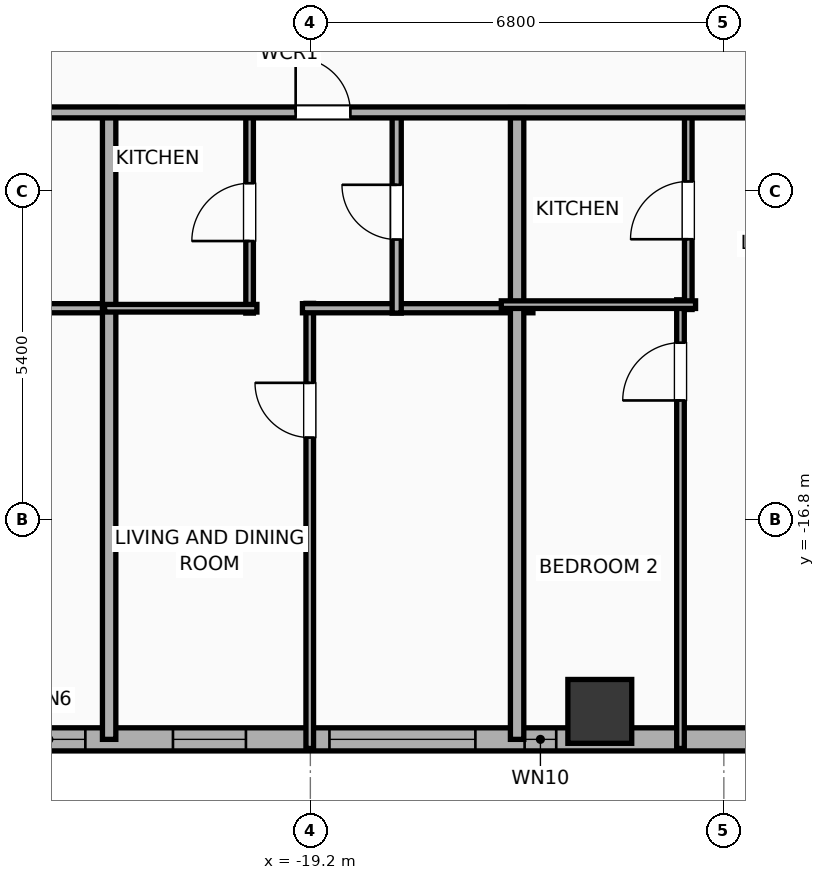
"""IFC4 building model, lengths in metres.
Left out: names, types, materials, properties, quantities, classifications, styles, units other than length and angle.
Written with IfcOpenShell. Run it as: python <this file> out.ifc"""

import sys

from ifc_helpers import new_model, si_unit, direction, frame, frame_2d, origin, origin_2d, place, context, subcontext, project, spatial, rectangle, hollow_rectangle, extrude, element, fill, save


model = new_model("IFC4")
c1 = context("Model", 3, precision=1e-05, world=origin(), true_north=direction((0.0, 1.0)))
c2 = subcontext(c1, "Body", "Model", "MODEL_VIEW")
j1 = project(units=[si_unit("LENGTHUNIT", "METRE"), si_unit("PLANEANGLEUNIT", "RADIAN")], contexts=[c1])
p1 = place(None, origin())
s1 = spatial("IfcSite", under=j1, at=p1, CompositionType="ELEMENT")
p2 = place(p1, origin())
s2 = spatial("IfcBuilding", under=s1, at=p2, CompositionType="ELEMENT")
p3 = place(p2, frame((0.0, 0.0, 97.5)))
s3 = spatial("IfcBuildingStorey", under=s2, at=p3, CompositionType="ELEMENT", Elevation=97.5)
p4 = place(p3, frame((-14.44, -19.95, 0.0), z_axis=(0.0, 0.0, 1.0), x_axis=(1.0, 0.0, 0.0)))
e1 = element("IfcColumn", 1, at=p4, inside=s3, PredefinedType="COLUMN", context=c2, shape_type="SweptSolid", body=[
    extrude(hollow_rectangle(XDim=1.05, YDim=1.05, WallThickness=0.036, at=origin_2d()), origin(), (0.0, 0.0, 1.0), 3.9),
])
p5 = place(p3, frame((29.381, -20.41, 0.0), z_axis=(0.0, 0.0, 1.0), x_axis=(-1.0, 0.0, 0.0)))
e2 = element("IfcWall", 2, at=p5, inside=s3, PredefinedType="ELEMENTEDWALL", context=c2, shape_type="SweptSolid", body=[
    extrude(rectangle(XDim=54.763, YDim=0.38, at=frame_2d((27.381, 0.0))), origin(), (0.0, 0.0, 1.0), 3.65),
])
p6 = place(p5, frame((6.495, 0.0, 0.75)))
e3 = element("IfcOpeningElement", 3, at=p6, cuts=e2, PredefinedType="OPENING", context=c2, shape_type="SweptSolid", body=[
    extrude(rectangle(XDim=2.4, YDim=2.1, at=frame_2d((1.2, 1.05))), frame((0.0, 0.2, 0.0), z_axis=(0.0, -1.0, 0.0), x_axis=(1.0, 0.0, 0.0)), (0.0, 0.0, 1.0), 0.4),
])
p7 = place(p5, frame((17.686, 0.0, 0.75)))
e4 = element("IfcOpeningElement", 4, at=p7, cuts=e2, PredefinedType="OPENING", context=c2, shape_type="SweptSolid", body=[
    extrude(rectangle(XDim=2.4, YDim=2.1, at=frame_2d((1.2, 1.05))), frame((0.0, 0.2, 0.0), z_axis=(0.0, -1.0, 0.0), x_axis=(1.0, 0.0, 0.0)), (0.0, 0.0, 1.0), 0.4),
])
p8 = place(p5, frame((34.677, 0.0, 0.75)))
e5 = element("IfcOpeningElement", 5, at=p8, cuts=e2, PredefinedType="OPENING", context=c2, shape_type="SweptSolid", body=[
    extrude(rectangle(XDim=2.4, YDim=2.1, at=frame_2d((1.2, 1.05))), frame((0.0, 0.2, 0.0), z_axis=(0.0, -1.0, 0.0), x_axis=(1.0, 0.0, 0.0)), (0.0, 0.0, 1.0), 0.4),
])
p9 = place(p5, frame((45.867, 0.0, 0.75)))
e6 = element("IfcOpeningElement", 6, at=p9, cuts=e2, PredefinedType="OPENING", context=c2, shape_type="SweptSolid", body=[
    extrude(rectangle(XDim=2.4, YDim=2.1, at=frame_2d((1.2, 1.05))), frame((0.0, 0.2, 0.0), z_axis=(0.0, -1.0, 0.0), x_axis=(1.0, 0.0, 0.0)), (0.0, 0.0, 1.0), 0.4),
])
p10 = place(p5, frame((52.281, 0.0, 0.75)))
e7 = element("IfcOpeningElement", 7, at=p10, cuts=e2, PredefinedType="OPENING", context=c2, shape_type="SweptSolid", body=[
    extrude(rectangle(XDim=1.2, YDim=2.05, at=frame_2d((0.6, 1.025))), frame((0.0, 0.2, 0.0), z_axis=(0.0, -1.0, 0.0), x_axis=(1.0, 0.0, 0.0)), (0.0, 0.0, 1.0), 0.4),
])
p11 = place(p5, frame((49.641, 0.0, 0.75)))
e8 = element("IfcOpeningElement", 8, at=p11, cuts=e2, PredefinedType="OPENING", context=c2, shape_type="SweptSolid", body=[
    extrude(rectangle(XDim=1.2, YDim=2.05, at=frame_2d((0.6, 1.025))), frame((0.0, 0.2, 0.0), z_axis=(0.0, -1.0, 0.0), x_axis=(1.0, 0.0, 0.0)), (0.0, 0.0, 1.0), 0.4),
])
p12 = place(p5, frame((39.543, 0.0, 0.75)))
e9 = element("IfcOpeningElement", 9, at=p12, cuts=e2, PredefinedType="OPENING", context=c2, shape_type="SweptSolid", body=[
    extrude(rectangle(XDim=1.2, YDim=2.05, at=frame_2d((0.6, 1.025))), frame((0.0, 0.2, 0.0), z_axis=(0.0, -1.0, 0.0), x_axis=(1.0, 0.0, 0.0)), (0.0, 0.0, 1.0), 0.4),
])
p13 = place(p5, frame((44.538, 0.0, 0.75)))
e10 = element("IfcOpeningElement", 10, at=p13, cuts=e2, PredefinedType="OPENING", context=c2, shape_type="SweptSolid", body=[
    extrude(rectangle(XDim=0.52, YDim=2.05, at=frame_2d((0.26, 1.025))), frame((0.0, 0.2, 0.0), z_axis=(0.0, -1.0, 0.0), x_axis=(1.0, 0.0, 0.0)), (0.0, 0.0, 1.0), 0.4),
])
p14 = place(p5, frame((28.206, 0.0, 0.75)))
e11 = element("IfcOpeningElement", 11, at=p14, cuts=e2, PredefinedType="OPENING", context=c2, shape_type="SweptSolid", body=[
    extrude(rectangle(XDim=1.2, YDim=2.05, at=frame_2d((0.6, 1.025))), frame((0.0, 0.2, 0.0), z_axis=(0.0, -1.0, 0.0), x_axis=(1.0, 0.0, 0.0)), (0.0, 0.0, 1.0), 0.4),
])
p15 = place(p5, frame((31.241, 0.0, 0.75)))
e12 = element("IfcOpeningElement", 12, at=p15, cuts=e2, PredefinedType="OPENING", context=c2, shape_type="SweptSolid", body=[
    extrude(rectangle(XDim=0.85, YDim=2.05, at=frame_2d((0.425, 1.025))), frame((0.0, 0.2, 0.0), z_axis=(0.0, -1.0, 0.0), x_axis=(1.0, 0.0, 0.0)), (0.0, 0.0, 1.0), 0.4),
])
p16 = place(p5, frame((24.561, 0.0, 0.75)))
e13 = element("IfcOpeningElement", 13, at=p16, cuts=e2, PredefinedType="OPENING", context=c2, shape_type="SweptSolid", body=[
    extrude(rectangle(XDim=1.2, YDim=2.05, at=frame_2d((0.6, 1.025))), frame((0.0, 0.2, 0.0), z_axis=(0.0, -1.0, 0.0), x_axis=(1.0, 0.0, 0.0)), (0.0, 0.0, 1.0), 0.4),
])
p17 = place(p5, frame((22.561, 0.0, 0.75)))
e14 = element("IfcOpeningElement", 14, at=p17, cuts=e2, PredefinedType="OPENING", context=c2, shape_type="SweptSolid", body=[
    extrude(rectangle(XDim=0.52, YDim=2.05, at=frame_2d((0.26, 1.025))), frame((0.0, 0.2, 0.0), z_axis=(0.0, -1.0, 0.0), x_axis=(1.0, 0.0, 0.0)), (0.0, 0.0, 1.0), 0.4),
])
p18 = place(p5, frame((13.886, 0.0, 0.75)))
e15 = element("IfcOpeningElement", 15, at=p18, cuts=e2, PredefinedType="OPENING", context=c2, shape_type="SweptSolid", body=[
    extrude(rectangle(XDim=1.2, YDim=2.05, at=frame_2d((0.6, 1.025))), frame((0.0, 0.2, 0.0), z_axis=(0.0, -1.0, 0.0), x_axis=(1.0, 0.0, 0.0)), (0.0, 0.0, 1.0), 0.4),
])
p19 = place(p5, frame((11.694, 0.0, 0.75)))
e16 = element("IfcOpeningElement", 16, at=p19, cuts=e2, PredefinedType="OPENING", context=c2, shape_type="SweptSolid", body=[
    extrude(rectangle(XDim=0.85, YDim=2.05, at=frame_2d((0.425, 1.025))), frame((0.0, 0.2, 0.0), z_axis=(0.0, -1.0, 0.0), x_axis=(1.0, 0.0, 0.0)), (0.0, 0.0, 1.0), 0.4),
])
p20 = place(p5, frame((3.286, 0.0, 0.75)))
e17 = element("IfcOpeningElement", 17, at=p20, cuts=e2, PredefinedType="OPENING", context=c2, shape_type="SweptSolid", body=[
    extrude(rectangle(XDim=1.2, YDim=2.05, at=frame_2d((0.6, 1.025))), frame((0.0, 0.2, 0.0), z_axis=(0.0, -1.0, 0.0), x_axis=(1.0, 0.0, 0.0)), (0.0, 0.0, 1.0), 0.4),
])
p21 = place(p5, frame((0.816, 0.0, 0.75)))
e18 = element("IfcOpeningElement", 18, at=p21, cuts=e2, PredefinedType="OPENING", context=c2, shape_type="SweptSolid", body=[
    extrude(rectangle(XDim=1.2, YDim=2.05, at=frame_2d((0.6, 1.025))), frame((0.0, 0.2, 0.0), z_axis=(0.0, -1.0, 0.0), x_axis=(1.0, 0.0, 0.0)), (0.0, 0.0, 1.0), 0.4),
])
p22 = place(p3, frame((-26.039, -13.32, 0.0), z_axis=(0.0, 0.0, 1.0), x_axis=(1.0, 0.0, 0.0)))
e19 = element("IfcWall", 19, at=p22, inside=s3, PredefinedType="PLUMBINGWALL", context=c2, shape_type="SweptSolid", body=[
    extrude(rectangle(XDim=3.605, YDim=0.15, at=frame_2d((1.802, 0.0))), origin(), (0.0, 0.0, 1.0), 3.65),
])
p23 = place(p3, frame((-22.509, -20.41, 0.0), z_axis=(0.0, 0.0, 1.0), x_axis=(0.0, 1.0, 0.0)))
e20 = element("IfcWall", 20, at=p23, inside=s3, PredefinedType="PARTITIONING", context=c2, shape_type="SweptSolid", body=[
    extrude(rectangle(XDim=10.39, YDim=0.22, at=frame_2d((5.195, 0.0))), origin(), (0.0, 0.0, 1.0), 3.65),
])
p24 = place(p3, frame((-19.21, -20.56, 0.0), z_axis=(0.0, 0.0, 1.0), x_axis=(0.0, 1.0, 0.0)))
e21 = element("IfcWall", 21, at=p24, inside=s3, PredefinedType="PARTITIONING", context=c2, shape_type="SweptSolid", body=[
    extrude(rectangle(XDim=7.32, YDim=0.125, at=frame_2d((3.66, 0.0))), origin(), (0.0, 0.0, 1.0), 3.65),
])
p25 = place(p24, frame((5.113, 0.0, 0.0)))
e22 = element("IfcOpeningElement", 22, at=p25, cuts=e21, PredefinedType="OPENING", context=c2, shape_type="SweptSolid", body=[
    extrude(rectangle(XDim=0.9, YDim=2.05, at=frame_2d((0.45, 1.025))), frame((0.0, 0.073, 0.0), z_axis=(0.0, -1.0, 0.0), x_axis=(1.0, 0.0, 0.0)), (0.0, 0.0, 1.0), 0.145),
])
p26 = place(p3, frame((-19.33, -13.32, 0.0), z_axis=(0.0, 0.0, 1.0), x_axis=(1.0, 0.0, 0.0)))
e23 = element("IfcWall", 23, at=p26, inside=s3, PredefinedType="PLUMBINGWALL", context=c2, shape_type="SweptSolid", body=[
    extrude(rectangle(XDim=3.79, YDim=0.15, at=frame_2d((1.895, 0.0))), origin(), (0.0, 0.0, 1.0), 3.65),
])
p27 = place(p3, frame((-20.199, -13.4, 0.0), z_axis=(0.0, 0.0, 1.0), x_axis=(0.0, 1.0, 0.0)))
e24 = element("IfcWall", 24, at=p27, inside=s3, PredefinedType="PARTITIONING", context=c2, shape_type="SweptSolid", body=[
    extrude(rectangle(XDim=3.32, YDim=0.125, at=frame_2d((1.66, 0.0))), origin(), (0.0, 0.0, 1.0), 3.65),
])
p28 = place(p27, frame((1.185, 0.0, 0.0)))
e25 = element("IfcOpeningElement", 25, at=p28, cuts=e24, PredefinedType="OPENING", context=c2, shape_type="SweptSolid", body=[
    extrude(rectangle(XDim=0.95, YDim=2.05, at=frame_2d((0.475, 1.025))), frame((0.0, 0.073, 0.0), z_axis=(0.0, -1.0, 0.0), x_axis=(1.0, 0.0, 0.0)), (0.0, 0.0, 1.0), 0.145),
])
p29 = place(p3, frame((-22.584, -13.32, 0.0), z_axis=(0.0, 0.0, 1.0), x_axis=(1.0, 0.0, 0.0)))
e26 = element("IfcWall", 26, at=p29, inside=s3, PredefinedType="PARTITIONING", context=c2, shape_type="SweptSolid", body=[
    extrude(rectangle(XDim=2.505, YDim=0.125, at=frame_2d((1.252, 0.0))), origin(), (0.0, 0.0, 1.0), 3.65),
])
p30 = place(p3, frame((-17.78, -13.4, 0.0), z_axis=(0.0, 0.0, 1.0), x_axis=(0.0, 1.0, 0.0)))
e27 = element("IfcWall", 27, at=p30, inside=s3, PredefinedType="PLUMBINGWALL", context=c2, shape_type="SweptSolid", body=[
    extrude(rectangle(XDim=3.32, YDim=0.15, at=frame_2d((1.66, 0.0))), origin(), (0.0, 0.0, 1.0), 3.65),
])
p31 = place(p30, frame((1.21, 0.0, 0.0)))
e28 = element("IfcOpeningElement", 28, at=p31, cuts=e27, PredefinedType="OPENING", context=c2, shape_type="SweptSolid", body=[
    extrude(rectangle(XDim=0.9, YDim=2.05, at=frame_2d((0.45, 1.025))), frame((0.0, 0.085, 0.0), z_axis=(0.0, -1.0, 0.0), x_axis=(1.0, 0.0, 0.0)), (0.0, 0.0, 1.0), 0.17),
])
p32 = place(p3, frame((-15.8, -20.41, 0.0), z_axis=(0.0, 0.0, 1.0), x_axis=(0.0, 1.0, 0.0)))
e29 = element("IfcWall", 29, at=p32, inside=s3, PredefinedType="PARTITIONING", context=c2, shape_type="SweptSolid", body=[
    extrude(rectangle(XDim=10.39, YDim=0.22, at=frame_2d((5.195, 0.0))), origin(), (0.0, 0.0, 1.0), 3.65),
])
p33 = place(p3, frame((-13.113, -20.56, 0.0), z_axis=(0.0, 0.0, 1.0), x_axis=(0.0, 1.0, 0.0)))
e30 = element("IfcWall", 30, at=p33, inside=s3, PredefinedType="PARTITIONING", context=c2, shape_type="SweptSolid", body=[
    extrude(rectangle(XDim=7.379, YDim=0.125, at=frame_2d((3.689, 0.0))), origin(), (0.0, 0.0, 1.0), 3.65),
])
p34 = place(p33, frame((5.723, 0.0, 0.0)))
e31 = element("IfcOpeningElement", 31, at=p34, cuts=e30, PredefinedType="OPENING", context=c2, shape_type="SweptSolid", body=[
    extrude(rectangle(XDim=0.95, YDim=2.05, at=frame_2d((0.475, 1.025))), frame((0.0, 0.073, 0.0), z_axis=(0.0, -1.0, 0.0), x_axis=(1.0, 0.0, 0.0)), (0.0, 0.0, 1.0), 0.145),
])
p35 = place(p3, frame((-12.985, -13.341, 0.0), z_axis=(0.0, 0.0, 1.0), x_axis=(0.0, 1.0, 0.0)))
e32 = element("IfcWall", 32, at=p35, inside=s3, PredefinedType="PARTITIONING", context=c2, shape_type="SweptSolid", body=[
    extrude(rectangle(XDim=3.261, YDim=0.125, at=frame_2d((1.63, 0.0))), origin(), (0.0, 0.0, 1.0), 3.65),
])
p36 = place(p35, frame((1.156, 0.0, 0.0)))
e33 = element("IfcOpeningElement", 33, at=p36, cuts=e32, PredefinedType="OPENING", context=c2, shape_type="SweptSolid", body=[
    extrude(rectangle(XDim=0.95, YDim=2.05, at=frame_2d((0.475, 1.025))), frame((0.0, 0.073, 0.0), z_axis=(0.0, -1.0, 0.0), x_axis=(1.0, 0.0, 0.0)), (0.0, 0.0, 1.0), 0.145),
])
p37 = place(p3, frame((-16.06, -13.261, 0.0), z_axis=(0.0, 0.0, 1.0), x_axis=(1.0, 0.0, 0.0)))
e34 = element("IfcWall", 34, at=p37, inside=s3, PredefinedType="PARTITIONING", context=c2, shape_type="SweptSolid", body=[
    extrude(rectangle(XDim=3.195, YDim=0.125, at=frame_2d((1.598, 0.0))), origin(), (0.0, 0.0, 1.0), 3.65),
])
p38 = place(p3, frame((-29.21, -10.1, 0.0), z_axis=(0.0, 0.0, 1.0), x_axis=(1.0, 0.0, 0.0)))
e35 = element("IfcWall", 35, at=p38, inside=s3, PredefinedType="PARTITIONING", context=c2, shape_type="SweptSolid", body=[
    extrude(rectangle(XDim=62.42, YDim=0.18, at=frame_2d((31.21, 0.0))), origin(), (0.0, 0.0, 1.0), 3.65),
])
p39 = place(p38, frame((3.033, 0.0, 0.0)))
e36 = element("IfcOpeningElement", 36, at=p39, cuts=e35, PredefinedType="OPENING", context=c2, shape_type="SweptSolid", body=[
    extrude(rectangle(XDim=0.9, YDim=2.05, at=frame_2d((0.45, 1.025))), frame((0.0, 0.1, 0.0), z_axis=(0.0, -1.0, 0.0), x_axis=(1.0, 0.0, 0.0)), (0.0, 0.0, 1.0), 0.2),
])
p40 = place(p38, frame((9.768, 0.0, 0.0)))
e37 = element("IfcOpeningElement", 37, at=p40, cuts=e35, PredefinedType="OPENING", context=c2, shape_type="SweptSolid", body=[
    extrude(rectangle(XDim=0.9, YDim=2.05, at=frame_2d((0.45, 1.025))), frame((0.0, 0.1, 0.0), z_axis=(0.0, -1.0, 0.0), x_axis=(1.0, 0.0, 0.0)), (0.0, 0.0, 1.0), 0.2),
])
p41 = place(p38, frame((18.65, 0.0, 0.0)))
e38 = element("IfcOpeningElement", 38, at=p41, cuts=e35, PredefinedType="OPENING", context=c2, shape_type="SweptSolid", body=[
    extrude(rectangle(XDim=1.15, YDim=2.05, at=frame_2d((0.575, 1.025))), frame((0.0, 0.1, 0.0), z_axis=(0.0, -1.0, 0.0), x_axis=(1.0, 0.0, 0.0)), (0.0, 0.0, 1.0), 0.2),
])
p42 = place(p38, frame((29.212, 0.0, 0.0)))
e39 = element("IfcOpeningElement", 39, at=p42, cuts=e35, PredefinedType="OPENING", context=c2, shape_type="SweptSolid", body=[
    extrude(rectangle(XDim=1.15, YDim=2.05, at=frame_2d((0.575, 1.025))), frame((0.0, 0.1, 0.0), z_axis=(0.0, -1.0, 0.0), x_axis=(1.0, 0.0, 0.0)), (0.0, 0.0, 1.0), 0.2),
])
p43 = place(p38, frame((40.379, 0.0, 0.0)))
e40 = element("IfcOpeningElement", 40, at=p43, cuts=e35, PredefinedType="OPENING", context=c2, shape_type="SweptSolid", body=[
    extrude(rectangle(XDim=1.15, YDim=2.05, at=frame_2d((0.575, 1.025))), frame((0.0, 0.1, 0.0), z_axis=(0.0, -1.0, 0.0), x_axis=(1.0, 0.0, 0.0)), (0.0, 0.0, 1.0), 0.2),
])
p44 = place(p38, frame((50.959, 0.0, 0.0)))
e41 = element("IfcOpeningElement", 41, at=p44, cuts=e35, PredefinedType="OPENING", context=c2, shape_type="SweptSolid", body=[
    extrude(rectangle(XDim=1.15, YDim=2.05, at=frame_2d((0.575, 1.025))), frame((0.0, 0.1, 0.0), z_axis=(0.0, -1.0, 0.0), x_axis=(1.0, 0.0, 0.0)), (0.0, 0.0, 1.0), 0.2),
])
p45 = place(p38, frame((59.117, 0.0, 0.0)))
e42 = element("IfcOpeningElement", 42, at=p45, cuts=e35, PredefinedType="OPENING", context=c2, shape_type="SweptSolid", body=[
    extrude(rectangle(XDim=0.9, YDim=2.05, at=frame_2d((0.45, 1.025))), frame((0.0, 0.1, 0.0), z_axis=(0.0, -1.0, 0.0), x_axis=(1.0, 0.0, 0.0)), (0.0, 0.0, 1.0), 0.2),
])
p46 = place(p9, origin())
e43 = element("IfcWindow", 43, at=p46, inside=s3, PartitioningType="SINGLE_PANEL", PredefinedType="WINDOW", context=c2, shape_type="SweptSolid", body=[
    extrude(rectangle(XDim=2.4, YDim=2.1, at=frame_2d((1.2, 1.05))), frame((0.0, 0.03, 0.0), z_axis=(0.0, -1.0, 0.0), x_axis=(1.0, 0.0, 0.0)), (0.0, 0.0, 1.0), 0.06),
])
fill(e6, e43)
p47 = place(p10, origin())
e44 = element("IfcWindow", 44, at=p47, inside=s3, PartitioningType="SINGLE_PANEL", PredefinedType="WINDOW", context=c2, shape_type="SweptSolid", body=[
    extrude(rectangle(XDim=1.2, YDim=2.05, at=frame_2d((0.6, 1.025))), frame((0.0, 0.03, 0.0), z_axis=(0.0, -1.0, 0.0), x_axis=(1.0, 0.0, 0.0)), (0.0, 0.0, 1.0), 0.06),
])
fill(e7, e44)
p48 = place(p11, origin())
e45 = element("IfcWindow", 45, at=p48, inside=s3, PartitioningType="SINGLE_PANEL", PredefinedType="WINDOW", context=c2, shape_type="SweptSolid", body=[
    extrude(rectangle(XDim=1.2, YDim=2.05, at=frame_2d((0.6, 1.025))), frame((0.0, 0.03, 0.0), z_axis=(0.0, -1.0, 0.0), x_axis=(1.0, 0.0, 0.0)), (0.0, 0.0, 1.0), 0.06),
])
fill(e8, e45)
p49 = place(p13, origin())
e46 = element("IfcWindow", 46, at=p49, inside=s3, PartitioningType="SINGLE_PANEL", PredefinedType="WINDOW", context=c2, shape_type="SweptSolid", body=[
    extrude(rectangle(XDim=0.52, YDim=2.05, at=frame_2d((0.26, 1.025))), frame((0.0, 0.03, 0.0), z_axis=(0.0, -1.0, 0.0), x_axis=(1.0, 0.0, 0.0)), (0.0, 0.0, 1.0), 0.06),
])
fill(e10, e46)
p50 = place(p25, origin())
e47 = element("IfcDoor", 47, at=p50, inside=s3, OperationType="SINGLE_SWING_RIGHT", PredefinedType="DOOR", context=c2, shape_type="SweptSolid", body=[
    extrude(rectangle(XDim=0.9, YDim=2.05, at=frame_2d((0.45, 1.025))), frame((0.0, 0.025, 0.0), z_axis=(0.0, -1.0, 0.0), x_axis=(1.0, 0.0, 0.0)), (0.0, 0.0, 1.0), 0.05),
])
fill(e22, e47)
p51 = place(p28, origin())
e48 = element("IfcDoor", 48, at=p51, inside=s3, OperationType="SINGLE_SWING_LEFT", PredefinedType="DOOR", context=c2, shape_type="SweptSolid", body=[
    extrude(rectangle(XDim=0.95, YDim=2.05, at=frame_2d((0.475, 1.025))), frame((0.0, 0.025, 0.0), z_axis=(0.0, -1.0, 0.0), x_axis=(1.0, 0.0, 0.0)), (0.0, 0.0, 1.0), 0.05),
])
fill(e25, e48)
p52 = place(p31, origin())
e49 = element("IfcDoor", 49, at=p52, inside=s3, OperationType="SINGLE_SWING_RIGHT", PredefinedType="DOOR", context=c2, shape_type="SweptSolid", body=[
    extrude(rectangle(XDim=0.9, YDim=2.05, at=frame_2d((0.45, 1.025))), frame((0.0, 0.025, 0.0), z_axis=(0.0, -1.0, 0.0), x_axis=(1.0, 0.0, 0.0)), (0.0, 0.0, 1.0), 0.05),
])
fill(e28, e49)
p53 = place(p34, origin())
e50 = element("IfcDoor", 50, at=p53, inside=s3, OperationType="SINGLE_SWING_LEFT", PredefinedType="DOOR", context=c2, shape_type="SweptSolid", body=[
    extrude(rectangle(XDim=0.95, YDim=2.05, at=frame_2d((0.475, 1.025))), frame((0.0, 0.025, 0.0), z_axis=(0.0, -1.0, 0.0), x_axis=(1.0, 0.0, 0.0)), (0.0, 0.0, 1.0), 0.05),
])
fill(e31, e50)
p54 = place(p36, origin())
e51 = element("IfcDoor", 51, at=p54, inside=s3, OperationType="SINGLE_SWING_LEFT", PredefinedType="DOOR", context=c2, shape_type="SweptSolid", body=[
    extrude(rectangle(XDim=0.95, YDim=2.05, at=frame_2d((0.475, 1.025))), frame((0.0, 0.025, 0.0), z_axis=(0.0, -1.0, 0.0), x_axis=(1.0, 0.0, 0.0)), (0.0, 0.0, 1.0), 0.05),
])
fill(e33, e51)
p55 = place(p40, origin())
e52 = element("IfcDoor", 52, at=p55, inside=s3, OperationType="SINGLE_SWING_LEFT", PredefinedType="DOOR", context=c2, shape_type="SweptSolid", body=[
    extrude(rectangle(XDim=0.9, YDim=2.05, at=frame_2d((0.45, 1.025))), frame((0.0, 0.025, 0.0), z_axis=(0.0, -1.0, 0.0), x_axis=(1.0, 0.0, 0.0)), (0.0, 0.0, 1.0), 0.05),
])
fill(e37, e52)
save(model, sys.argv[1])
